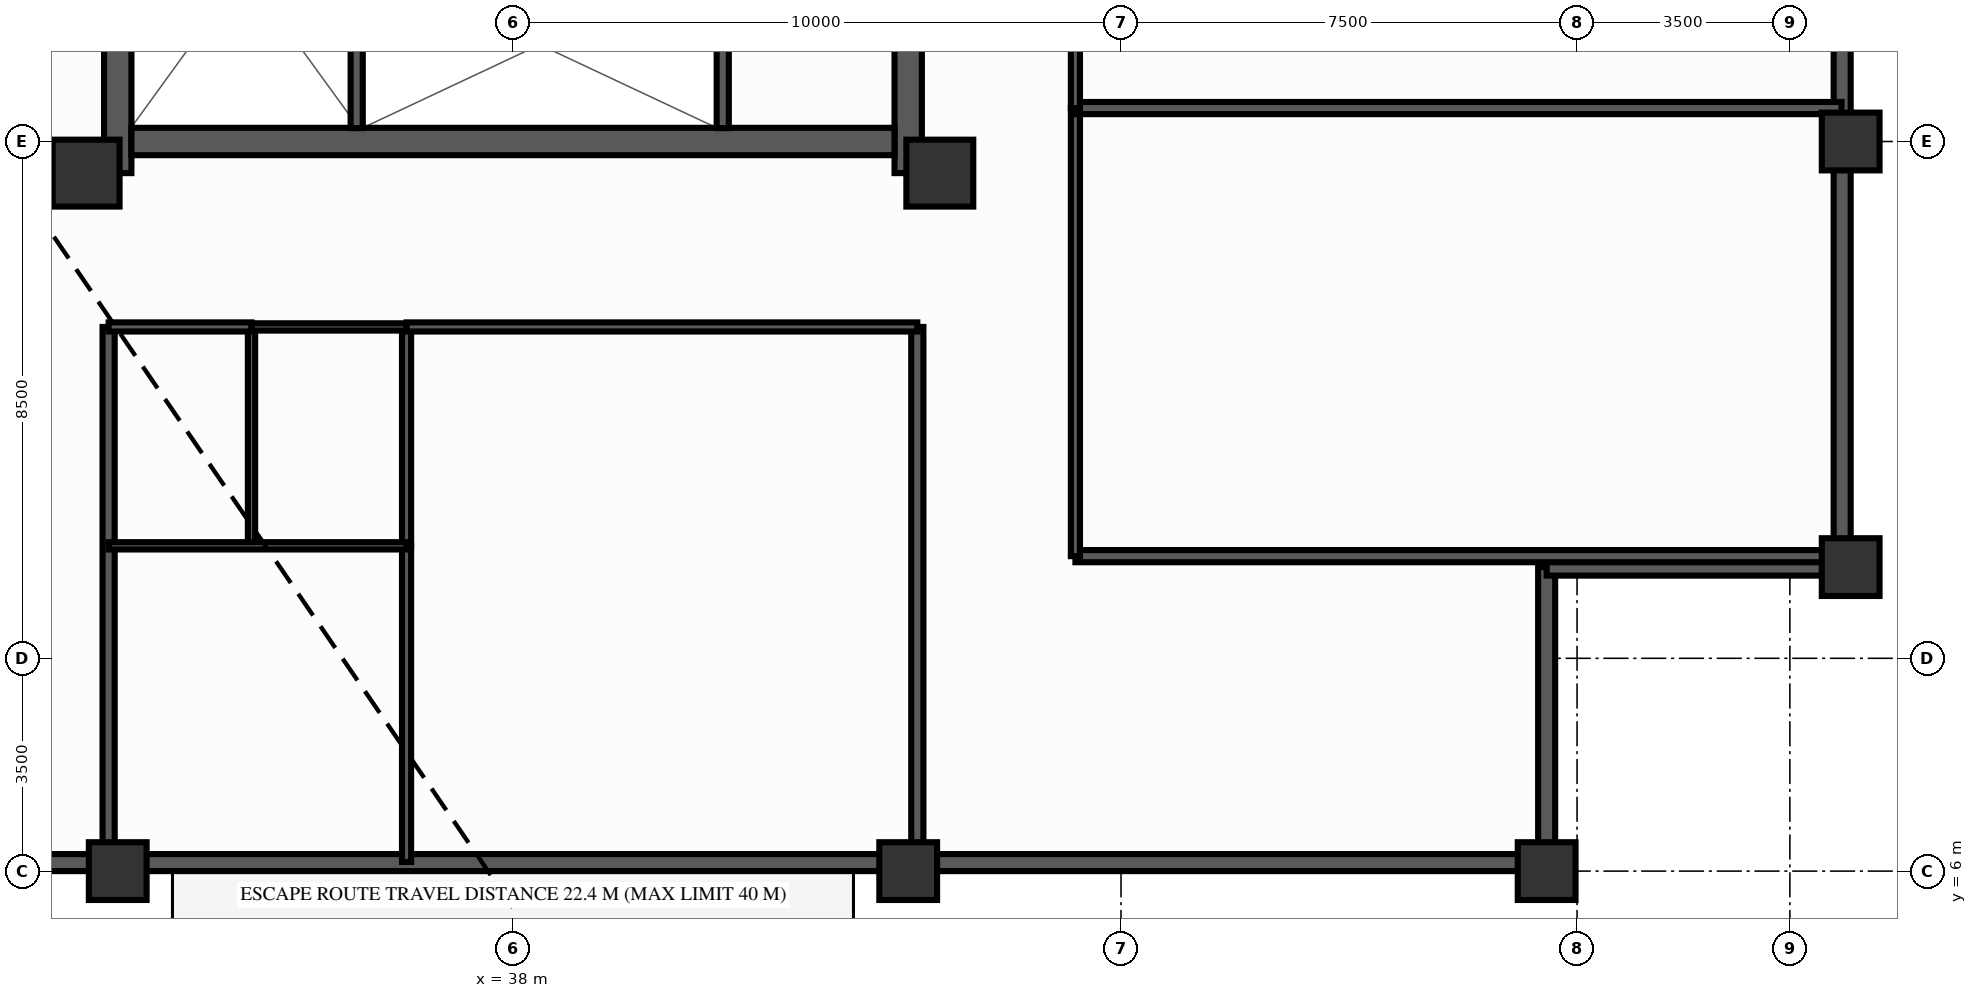
"""IFC4 building model, lengths in metres.
Left out: names, types, materials, properties, quantities, classifications, styles, units other than length and angle.
Written with IfcOpenShell. Run it as: python <this file> out.ifc"""

import sys

from ifc_helpers import new_model, si_unit, direction, frame, frame_2d, origin, origin_2d, place, context, subcontext, project, spatial, rectangle, extrude, source, transform, mapped, element, fill, save


model = new_model("IFC4")
c1 = context("Model", 3, precision=1e-05, world=origin(), true_north=direction((0.0, 1.0)))
c2 = subcontext(c1, "Body", "Model", "MODEL_VIEW")
j1 = project(units=[si_unit("LENGTHUNIT", "METRE"), si_unit("PLANEANGLEUNIT", "RADIAN")], contexts=[c1])
p1 = place(None, origin())
s1 = spatial("IfcSite", under=j1, at=p1, CompositionType="ELEMENT")
p2 = place(p1, origin())
s2 = spatial("IfcBuilding", under=s1, at=p2, CompositionType="ELEMENT")
p3 = place(p2, frame((0.0, 0.0, 148.7)))
s3 = spatial("IfcBuildingStorey", under=s2, at=p3, CompositionType="ELEMENT", Elevation=148.7)
p4 = place(p3, frame((31.5, 17.48, 0.0), z_axis=(0.0, 0.0, 1.0), x_axis=(0.0, 1.0, 0.0)))
e1 = element("IfcWall", 1, at=p4, inside=s3, PredefinedType="SHEAR", context=c2, shape_type="SweptSolid", body=[
    extrude(rectangle(XDim=19.04, YDim=0.45, at=frame_2d((9.52, 0.0))), origin(), (0.0, 0.0, 1.0), 3.5),
])
p5 = place(p4, frame((6.32, 0.0, 0.0)))
e2 = element("IfcOpeningElement", 2, at=p5, cuts=e1, PredefinedType="OPENING", context=c2, shape_type="SweptSolid", body=[
    extrude(rectangle(XDim=1.1, YDim=2.15, at=frame_2d((0.55, 1.075))), frame((0.0, 0.237, 0.0), z_axis=(0.0, -1.0, 0.0), x_axis=(1.0, 0.0, 0.0)), (0.0, 0.0, 1.0), 0.474),
])
p6 = place(p3, frame((44.5, 17.48, 0.0), z_axis=(0.0, 0.0, 1.0), x_axis=(0.0, 1.0, 0.0)))
e3 = element("IfcWall", 3, at=p6, inside=s3, PredefinedType="SHEAR", context=c2, shape_type="SweptSolid", body=[
    extrude(rectangle(XDim=19.04, YDim=0.45, at=frame_2d((9.52, 0.0))), origin(), (0.0, 0.0, 1.0), 3.5),
])
p7 = place(p6, frame((12.67, 0.0, 0.0), z_axis=(0.0, 0.0, 1.0), x_axis=(-1.0, 0.0, 0.0)))
e4 = element("IfcOpeningElement", 4, at=p7, cuts=e3, PredefinedType="OPENING", context=c2, shape_type="SweptSolid", body=[
    extrude(rectangle(XDim=1.1, YDim=2.15, at=frame_2d((0.55, 1.075))), frame((0.0, 0.237, 0.0), z_axis=(0.0, -1.0, 0.0), x_axis=(1.0, 0.0, 0.0)), (0.0, 0.0, 1.0), 0.474),
])
p8 = place(p3, frame((31.725, 18.0, 0.0), z_axis=(0.0, 0.0, 1.0), x_axis=(1.0, 0.0, 0.0)))
e5 = element("IfcWall", 5, at=p8, inside=s3, PredefinedType="SHEAR", context=c2, shape_type="SweptSolid", body=[
    extrude(rectangle(XDim=12.55, YDim=0.45, at=frame_2d((6.275, 0.0))), origin(), (0.0, 0.0, 1.0), 3.5),
])
m1 = source(origin(), c2, "Body", "SweptSolid", [
    extrude(rectangle(XDim=1.1, YDim=1.1, at=origin_2d()), origin(), (0.0, 0.0, 1.0), 3.5),
])
for number, where, z_axis, x_axis in (
    (6, (30.98, 17.48, 0.0), (0.0, 0.0, 1.0), (1.0, 0.0, 0.0)),
    (7, (45.02, 17.48, 0.0), (0.0, 0.0, 1.0), (1.0, 0.0, 0.0)),
):
    element("IfcColumn", number, at=place(p3, frame(where, z_axis=z_axis, x_axis=x_axis)), inside=s3, PredefinedType="COLUMN", context=c2, shape_type="MappedRepresentation", body=[
        mapped(m1, transform((0.0, 0.0, 0.0), scale=1.0)),
    ])
m2 = source(origin(), c2, "Body", "SweptSolid", [
    extrude(rectangle(XDim=0.95, YDim=0.95, at=origin_2d()), origin(), (0.0, 0.0, 1.0), 3.5),
])
for number, where, z_axis, x_axis in (
    (8, (31.5, 6.0, 0.0), (0.0, 0.0, 1.0), (1.0, 0.0, 0.0)),
    (9, (44.5, 6.0, 0.0), (0.0, 0.0, 1.0), (1.0, 0.0, 0.0)),
    (10, (55.0, 6.0, 0.0), (0.0, 0.0, 1.0), (1.0, 0.0, 0.0)),
    (11, (60.0, 11.0, 0.0), (0.0, 0.0, 1.0), (1.0, 0.0, 0.0)),
    (12, (60.0, 18.0, 0.0), (0.0, 0.0, 1.0), (1.0, 0.0, 0.0)),
):
    element("IfcColumn", number, at=place(p3, frame(where, z_axis=z_axis, x_axis=x_axis)), inside=s3, PredefinedType="COLUMN", context=c2, shape_type="MappedRepresentation", body=[
        mapped(m2, transform((0.0, 0.0, 0.0), scale=1.0)),
    ])
p9 = place(p3, frame((21.0, 6.14, 0.0), z_axis=(0.0, 0.0, 1.0), x_axis=(1.0, 0.0, 0.0)))
e13 = element("IfcWall", 13, at=p9, inside=s3, PredefinedType="SOLIDWALL", context=c2, shape_type="SweptSolid", body=[
    extrude(rectangle(XDim=34.0, YDim=0.28, at=frame_2d((17.0, 0.0))), origin(), (0.0, 0.0, 1.0), 2.39),
])
p10 = place(p9, frame((4.65, 0.0, 0.25)))
e14 = element("IfcOpeningElement", 14, at=p10, cuts=e13, PredefinedType="OPENING", context=c2, shape_type="SweptSolid", body=[
    extrude(rectangle(XDim=1.2, YDim=1.5, at=frame_2d((0.6, 0.75))), frame((0.0, 0.152, 0.0), z_axis=(0.0, -1.0, 0.0), x_axis=(1.0, 0.0, 0.0)), (0.0, 0.0, 1.0), 0.304),
])
p11 = place(p9, frame((12.433, 0.0, 0.25)))
e15 = element("IfcOpeningElement", 15, at=p11, cuts=e13, PredefinedType="OPENING", context=c2, shape_type="SweptSolid", body=[
    extrude(rectangle(XDim=1.2, YDim=1.5, at=frame_2d((0.6, 0.75))), frame((0.0, 0.152, 0.0), z_axis=(0.0, -1.0, 0.0), x_axis=(1.0, 0.0, 0.0)), (0.0, 0.0, 1.0), 0.304),
])
p12 = place(p9, frame((18.617, 0.0, 0.25)))
e16 = element("IfcOpeningElement", 16, at=p12, cuts=e13, PredefinedType="OPENING", context=c2, shape_type="SweptSolid", body=[
    extrude(rectangle(XDim=1.2, YDim=1.5, at=frame_2d((0.6, 0.75))), frame((0.0, 0.152, 0.0), z_axis=(0.0, -1.0, 0.0), x_axis=(1.0, 0.0, 0.0)), (0.0, 0.0, 1.0), 0.304),
])
p13 = place(p9, frame((28.15, 0.0, 0.25)))
e17 = element("IfcOpeningElement", 17, at=p13, cuts=e13, PredefinedType="OPENING", context=c2, shape_type="SweptSolid", body=[
    extrude(rectangle(XDim=1.2, YDim=1.5, at=frame_2d((0.6, 0.75))), frame((0.0, 0.152, 0.0), z_axis=(0.0, -1.0, 0.0), x_axis=(1.0, 0.0, 0.0)), (0.0, 0.0, 1.0), 0.304),
])
p14 = place(p9, frame((21.7, 0.0, 0.0), z_axis=(0.0, 0.0, 1.0), x_axis=(-1.0, 0.0, 0.0)))
e18 = element("IfcOpeningElement", 18, at=p14, cuts=e13, PredefinedType="OPENING", context=c2, shape_type="SweptSolid", body=[
    extrude(rectangle(XDim=1.1, YDim=2.15, at=frame_2d((0.55, 1.075))), frame((0.0, 0.152, 0.0), z_axis=(0.0, -1.0, 0.0), x_axis=(1.0, 0.0, 0.0)), (0.0, 0.0, 1.0), 0.304),
])
p15 = place(p3, frame((59.86, 11.0, 0.0), z_axis=(0.0, 0.0, 1.0), x_axis=(0.0, 1.0, 0.0)))
e19 = element("IfcWall", 19, at=p15, inside=s3, PredefinedType="SOLIDWALL", context=c2, shape_type="SweptSolid", body=[
    extrude(rectangle(XDim=32.0, YDim=0.28, at=frame_2d((16.0, 0.0))), origin(), (0.0, 0.0, 1.0), 2.39),
])
p16 = place(p15, frame((2.9, 0.0, 0.25)))
e20 = element("IfcOpeningElement", 20, at=p16, cuts=e19, PredefinedType="OPENING", context=c2, shape_type="SweptSolid", body=[
    extrude(rectangle(XDim=1.2, YDim=1.5, at=frame_2d((0.6, 0.75))), frame((0.0, 0.152, 0.0), z_axis=(0.0, -1.0, 0.0), x_axis=(1.0, 0.0, 0.0)), (0.0, 0.0, 1.0), 0.304),
])
p17 = place(p15, frame((10.635, 0.0, 0.25)))
e21 = element("IfcOpeningElement", 21, at=p17, cuts=e19, PredefinedType="OPENING", context=c2, shape_type="SweptSolid", body=[
    extrude(rectangle(XDim=1.2, YDim=1.5, at=frame_2d((0.6, 0.75))), frame((0.0, 0.152, 0.0), z_axis=(0.0, -1.0, 0.0), x_axis=(1.0, 0.0, 0.0)), (0.0, 0.0, 1.0), 0.304),
])
p18 = place(p15, frame((15.4, 0.0, 0.25)))
e22 = element("IfcOpeningElement", 22, at=p18, cuts=e19, PredefinedType="OPENING", context=c2, shape_type="SweptSolid", body=[
    extrude(rectangle(XDim=1.2, YDim=1.5, at=frame_2d((0.6, 0.75))), frame((0.0, 0.152, 0.0), z_axis=(0.0, -1.0, 0.0), x_axis=(1.0, 0.0, 0.0)), (0.0, 0.0, 1.0), 0.304),
])
p19 = place(p15, frame((20.165, 0.0, 0.25)))
e23 = element("IfcOpeningElement", 23, at=p19, cuts=e19, PredefinedType="OPENING", context=c2, shape_type="SweptSolid", body=[
    extrude(rectangle(XDim=1.2, YDim=1.5, at=frame_2d((0.6, 0.75))), frame((0.0, 0.152, 0.0), z_axis=(0.0, -1.0, 0.0), x_axis=(1.0, 0.0, 0.0)), (0.0, 0.0, 1.0), 0.304),
])
p20 = place(p15, frame((27.9, 0.0, 0.25)))
e24 = element("IfcOpeningElement", 24, at=p20, cuts=e19, PredefinedType="OPENING", context=c2, shape_type="SweptSolid", body=[
    extrude(rectangle(XDim=1.2, YDim=1.5, at=frame_2d((0.6, 0.75))), frame((0.0, 0.152, 0.0), z_axis=(0.0, -1.0, 0.0), x_axis=(1.0, 0.0, 0.0)), (0.0, 0.0, 1.0), 0.304),
])
for number, where, z_axis, x_axis in (
    (25, (55.0, 6.08, 0.0), (0.0, 0.0, 1.0), (0.0, 1.0, 0.0)),
    (26, (55.0, 11.0, 0.0), (0.0, 0.0, 1.0), (1.0, 0.0, 0.0)),
):
    element("IfcWall", number, at=place(p3, frame(where, z_axis=z_axis, x_axis=x_axis)), inside=s3, PredefinedType="SOLIDWALL", context=c2, shape_type="SweptSolid", body=[
        extrude(rectangle(XDim=4.92, YDim=0.28, at=frame_2d((2.46, 0.0))), origin(), (0.0, 0.0, 1.0), 2.39),
    ])
p21 = place(p3, frame((41.45, 18.22, 0.0), z_axis=(0.0, 0.0, 1.0), x_axis=(0.0, 1.0, 0.0)))
e27 = element("IfcWall", 27, at=p21, inside=s3, PredefinedType="PARTITIONING", context=c2, shape_type="SweptSolid", body=[
    extrude(rectangle(XDim=2.96, YDim=0.2, at=frame_2d((1.48, 0.0))), origin(), (0.0, 0.0, 1.0), 3.16),
])
p22 = place(p3, frame((35.43, 18.22, 0.0), z_axis=(0.0, 0.0, 1.0), x_axis=(0.0, 1.0, 0.0)))
e28 = element("IfcWall", 28, at=p22, inside=s3, PredefinedType="SOLIDWALL", context=c2, shape_type="SweptSolid", body=[
    extrude(rectangle(XDim=7.22, YDim=0.2, at=frame_2d((3.61, 0.0))), origin(), (0.0, 0.0, 1.0), 3.29),
])
p23 = place(p22, frame((6.68, 0.0, 0.0), z_axis=(0.0, 0.0, 1.0), x_axis=(-1.0, 0.0, 0.0)))
e29 = element("IfcOpeningElement", 29, at=p23, cuts=e28, PredefinedType="OPENING", context=c2, shape_type="SweptSolid", body=[
    extrude(rectangle(XDim=1.1, YDim=2.15, at=frame_2d((0.55, 1.075))), frame((0.0, 0.112, 0.0), z_axis=(0.0, -1.0, 0.0), x_axis=(1.0, 0.0, 0.0)), (0.0, 0.0, 1.0), 0.224),
])
for number, where, z_axis, x_axis in (
    (30, (31.35, 14.95, 0.0), (0.0, 0.0, 1.0), (0.0, -1.0, 0.0)),
    (31, (44.65, 14.95, 0.0), (0.0, 0.0, 1.0), (0.0, -1.0, 0.0)),
):
    element("IfcWall", number, at=place(p3, frame(where, z_axis=z_axis, x_axis=x_axis)), inside=s3, PredefinedType="PARTITIONING", context=c2, shape_type="SweptSolid", body=[
        extrude(rectangle(XDim=8.8, YDim=0.2, at=frame_2d((4.4, 0.0))), origin(), (0.0, 0.0, 1.0), 2.39),
    ])
p24 = place(p3, frame((33.7, 14.95, 0.0), z_axis=(0.0, 0.0, 1.0), x_axis=(0.0, -1.0, 0.0)))
e32 = element("IfcWall", 32, at=p24, inside=s3, PredefinedType="PARTITIONING", context=c2, shape_type="SweptSolid", body=[
    extrude(rectangle(XDim=3.6, YDim=0.12, at=frame_2d((1.8, 0.0))), origin(), (0.0, 0.0, 1.0), 3.16),
])
p25 = place(p3, frame((36.25, 14.95, 0.0), z_axis=(0.0, 0.0, 1.0), x_axis=(0.0, -1.0, 0.0)))
e33 = element("IfcWall", 33, at=p25, inside=s3, PredefinedType="PARTITIONING", context=c2, shape_type="SweptSolid", body=[
    extrude(rectangle(XDim=3.6, YDim=0.15, at=frame_2d((1.8, 0.0))), origin(), (0.0, 0.0, 1.0), 3.16),
])
p26 = place(p3, frame((36.25, 11.35, 0.0), z_axis=(0.0, 0.0, 1.0), x_axis=(0.0, -1.0, 0.0)))
e34 = element("IfcWall", 34, at=p26, inside=s3, PredefinedType="PARTITIONING", context=c2, shape_type="SweptSolid", body=[
    extrude(rectangle(XDim=5.2, YDim=0.15, at=frame_2d((2.6, 0.0))), origin(), (0.0, 0.0, 1.0), 3.16),
])
p27 = place(p26, frame((2.15, 0.0, 0.0)))
e35 = element("IfcOpeningElement", 35, at=p27, cuts=e34, PredefinedType="OPENING", context=c2, shape_type="SweptSolid", body=[
    extrude(rectangle(XDim=0.9, YDim=2.1, at=frame_2d((0.45, 1.05))), frame((0.0, 0.087, 0.0), z_axis=(0.0, -1.0, 0.0), x_axis=(1.0, 0.0, 0.0)), (0.0, 0.0, 1.0), 0.174),
])
p28 = place(p3, frame((31.35, 11.35, 0.0), z_axis=(0.0, 0.0, 1.0), x_axis=(1.0, 0.0, 0.0)))
e36 = element("IfcWall", 36, at=p28, inside=s3, PredefinedType="PARTITIONING", context=c2, shape_type="SweptSolid", body=[
    extrude(rectangle(XDim=4.9, YDim=0.12, at=frame_2d((2.45, 0.0))), origin(), (0.0, 0.0, 1.0), 2.89),
])
p29 = place(p3, frame((31.35, 14.95, 0.0), z_axis=(0.0, 0.0, 1.0), x_axis=(1.0, 0.0, 0.0)))
e37 = element("IfcWall", 37, at=p29, inside=s3, PredefinedType="PARTITIONING", context=c2, shape_type="SweptSolid", body=[
    extrude(rectangle(XDim=2.35, YDim=0.15, at=frame_2d((1.175, 0.0))), origin(), (0.0, 0.0, 1.0), 3.16),
])
p30 = place(p29, frame((0.725, 0.0, 0.0)))
e38 = element("IfcOpeningElement", 38, at=p30, cuts=e37, PredefinedType="OPENING", context=c2, shape_type="SweptSolid", body=[
    extrude(rectangle(XDim=0.9, YDim=2.1, at=frame_2d((0.45, 1.05))), frame((0.0, 0.087, 0.0), z_axis=(0.0, -1.0, 0.0), x_axis=(1.0, 0.0, 0.0)), (0.0, 0.0, 1.0), 0.174),
])
p31 = place(p3, frame((33.7, 14.95, 0.0), z_axis=(0.0, 0.0, 1.0), x_axis=(1.0, 0.0, 0.0)))
e39 = element("IfcWall", 39, at=p31, inside=s3, PredefinedType="PARTITIONING", context=c2, shape_type="SweptSolid", body=[
    extrude(rectangle(XDim=2.55, YDim=0.12, at=frame_2d((1.275, 0.0))), origin(), (0.0, 0.0, 1.0), 3.16),
])
p32 = place(p31, frame((0.775, 0.0, 0.0)))
e40 = element("IfcOpeningElement", 40, at=p32, cuts=e39, PredefinedType="OPENING", context=c2, shape_type="SweptSolid", body=[
    extrude(rectangle(XDim=1.0, YDim=2.1, at=frame_2d((0.5, 1.05))), frame((0.0, 0.072, 0.0), z_axis=(0.0, -1.0, 0.0), x_axis=(1.0, 0.0, 0.0)), (0.0, 0.0, 1.0), 0.144),
])
p33 = place(p3, frame((36.25, 14.95, 0.0), z_axis=(0.0, 0.0, 1.0), x_axis=(1.0, 0.0, 0.0)))
e41 = element("IfcWall", 41, at=p33, inside=s3, PredefinedType="PARTITIONING", context=c2, shape_type="SweptSolid", body=[
    extrude(rectangle(XDim=8.4, YDim=0.15, at=frame_2d((4.2, 0.0))), origin(), (0.0, 0.0, 1.0), 3.16),
])
p34 = place(p33, frame((3.367, 0.0, 0.0)))
e42 = element("IfcOpeningElement", 42, at=p34, cuts=e41, PredefinedType="OPENING", context=c2, shape_type="SweptSolid", body=[
    extrude(rectangle(XDim=1.1, YDim=2.15, at=frame_2d((0.55, 1.075))), frame((0.0, 0.087, 0.0), z_axis=(0.0, -1.0, 0.0), x_axis=(1.0, 0.0, 0.0)), (0.0, 0.0, 1.0), 0.174),
])
p35 = place(p3, frame((47.25, 11.18, 0.0), z_axis=(0.0, 0.0, 1.0), x_axis=(1.0, 0.0, 0.0)))
e43 = element("IfcWall", 43, at=p35, inside=s3, PredefinedType="PARTITIONING", context=c2, shape_type="SweptSolid", body=[
    extrude(rectangle(XDim=12.6, YDim=0.2, at=frame_2d((6.3, 0.0))), origin(), (0.0, 0.0, 1.0), 3.16),
])
p36 = place(p3, frame((47.25, 11.18, 0.0), z_axis=(0.0, 0.0, 1.0), x_axis=(0.0, 1.0, 0.0)))
e44 = element("IfcWall", 44, at=p36, inside=s3, PredefinedType="PARTITIONING", context=c2, shape_type="SweptSolid", body=[
    extrude(rectangle(XDim=7.37, YDim=0.15, at=frame_2d((3.685, 0.0))), origin(), (0.0, 0.0, 1.0), 3.16),
])
p37 = place(p36, frame((3.135, 0.0, 0.0)))
e45 = element("IfcOpeningElement", 45, at=p37, cuts=e44, PredefinedType="OPENING", context=c2, shape_type="SweptSolid", body=[
    extrude(rectangle(XDim=1.1, YDim=2.15, at=frame_2d((0.55, 1.075))), frame((0.0, 0.087, 0.0), z_axis=(0.0, -1.0, 0.0), x_axis=(1.0, 0.0, 0.0)), (0.0, 0.0, 1.0), 0.174),
])
p38 = place(p3, frame((47.25, 18.55, 0.0), z_axis=(0.0, 0.0, 1.0), x_axis=(1.0, 0.0, 0.0)))
e46 = element("IfcWall", 46, at=p38, inside=s3, PredefinedType="PARTITIONING", context=c2, shape_type="SweptSolid", body=[
    extrude(rectangle(XDim=12.6, YDim=0.2, at=frame_2d((6.3, 0.0))), origin(), (0.0, 0.0, 1.0), 3.16),
])
p39 = place(p3, frame((47.25, 18.55, 0.0), z_axis=(0.0, 0.0, 1.0), x_axis=(0.0, 1.0, 0.0)))
e47 = element("IfcWall", 47, at=p39, inside=s3, PredefinedType="PARTITIONING", context=c2, shape_type="SweptSolid", body=[
    extrude(rectangle(XDim=7.37, YDim=0.15, at=frame_2d((3.685, 0.0))), origin(), (0.0, 0.0, 1.0), 3.16),
])
p40 = place(p39, frame((3.135, 0.0, 0.0)))
e48 = element("IfcOpeningElement", 48, at=p40, cuts=e47, PredefinedType="OPENING", context=c2, shape_type="SweptSolid", body=[
    extrude(rectangle(XDim=1.1, YDim=2.15, at=frame_2d((0.55, 1.075))), frame((0.0, 0.087, 0.0), z_axis=(0.0, -1.0, 0.0), x_axis=(1.0, 0.0, 0.0)), (0.0, 0.0, 1.0), 0.174),
])
m3 = source(origin(), c2, "Body", "SweptSolid", [
    extrude(rectangle(XDim=1.2, YDim=1.5, at=frame_2d((0.6, 0.75))), frame((0.0, 0.03, 0.0), z_axis=(0.0, -1.0, 0.0), x_axis=(1.0, 0.0, 0.0)), (0.0, 0.0, 1.0), 0.06),
])
p41 = place(p11, origin())
e49 = element("IfcWindow", 49, at=p41, inside=s3, PartitioningType="SINGLE_PANEL", PredefinedType="WINDOW", context=c2, shape_type="MappedRepresentation", body=[
    mapped(m3, transform((0.0, 0.0, 0.0), scale=1.0)),
])
fill(e15, e49)
p42 = place(p12, origin())
e50 = element("IfcWindow", 50, at=p42, inside=s3, PartitioningType="SINGLE_PANEL", PredefinedType="WINDOW", context=c2, shape_type="MappedRepresentation", body=[
    mapped(m3, transform((0.0, 0.0, 0.0), scale=1.0)),
])
fill(e16, e50)
p43 = place(p13, origin())
e51 = element("IfcWindow", 51, at=p43, inside=s3, PartitioningType="SINGLE_PANEL", PredefinedType="WINDOW", context=c2, shape_type="MappedRepresentation", body=[
    mapped(m3, transform((0.0, 0.0, 0.0), scale=1.0)),
])
fill(e17, e51)
p44 = place(p16, origin())
e52 = element("IfcWindow", 52, at=p44, inside=s3, PartitioningType="SINGLE_PANEL", PredefinedType="WINDOW", context=c2, shape_type="MappedRepresentation", body=[
    mapped(m3, transform((0.0, 0.0, 0.0), scale=1.0)),
])
fill(e20, e52)
m4 = source(origin(), c2, "Body", "SweptSolid", [
    extrude(rectangle(XDim=1.1, YDim=2.15, at=frame_2d((0.55, 1.075))), frame((0.0, 0.025, 0.0), z_axis=(0.0, -1.0, 0.0), x_axis=(1.0, 0.0, 0.0)), (0.0, 0.0, 1.0), 0.05),
])
p45 = place(p14, origin())
e53 = element("IfcDoor", 53, at=p45, inside=s3, OperationType="SINGLE_SWING_LEFT", PredefinedType="DOOR", context=c2, shape_type="MappedRepresentation", body=[
    mapped(m4, transform((0.0, 0.0, 0.0), scale=1.0)),
])
fill(e18, e53)
m5 = source(origin(), c2, "Body", "SweptSolid", [
    extrude(rectangle(XDim=0.9, YDim=2.1, at=frame_2d((0.45, 1.05))), frame((0.0, 0.025, 0.0), z_axis=(0.0, -1.0, 0.0), x_axis=(1.0, 0.0, 0.0)), (0.0, 0.0, 1.0), 0.05),
])
p46 = place(p27, origin())
e54 = element("IfcDoor", 54, at=p46, inside=s3, OperationType="SINGLE_SWING_RIGHT", PredefinedType="DOOR", context=c2, shape_type="MappedRepresentation", body=[
    mapped(m5, transform((0.0, 0.0, 0.0), scale=1.0)),
])
fill(e35, e54)
p47 = place(p30, origin())
e55 = element("IfcDoor", 55, at=p47, inside=s3, OperationType="SINGLE_SWING_LEFT", PredefinedType="DOOR", context=c2, shape_type="MappedRepresentation", body=[
    mapped(m5, transform((0.0, 0.0, 0.0), scale=1.0)),
])
fill(e38, e55)
m6 = source(origin(), c2, "Body", "SweptSolid", [
    extrude(rectangle(XDim=1.0, YDim=2.1, at=frame_2d((0.5, 1.05))), frame((0.0, 0.025, 0.0), z_axis=(0.0, -1.0, 0.0), x_axis=(1.0, 0.0, 0.0)), (0.0, 0.0, 1.0), 0.05),
])
p48 = place(p32, origin())
e56 = element("IfcDoor", 56, at=p48, inside=s3, OperationType="SINGLE_SWING_RIGHT", PredefinedType="DOOR", context=c2, shape_type="MappedRepresentation", body=[
    mapped(m6, transform((0.0, 0.0, 0.0), scale=1.0)),
])
fill(e40, e56)
p49 = place(p34, origin())
e57 = element("IfcDoor", 57, at=p49, inside=s3, OperationType="SINGLE_SWING_LEFT", PredefinedType="DOOR", context=c2, shape_type="MappedRepresentation", body=[
    mapped(m4, transform((0.0, 0.0, 0.0), scale=1.0)),
])
fill(e42, e57)
p50 = place(p37, origin())
e58 = element("IfcDoor", 58, at=p50, inside=s3, OperationType="SINGLE_SWING_LEFT", PredefinedType="DOOR", context=c2, shape_type="MappedRepresentation", body=[
    mapped(m4, transform((0.0, 0.0, 0.0), scale=1.0)),
])
fill(e45, e58)
save(model, sys.argv[1])
